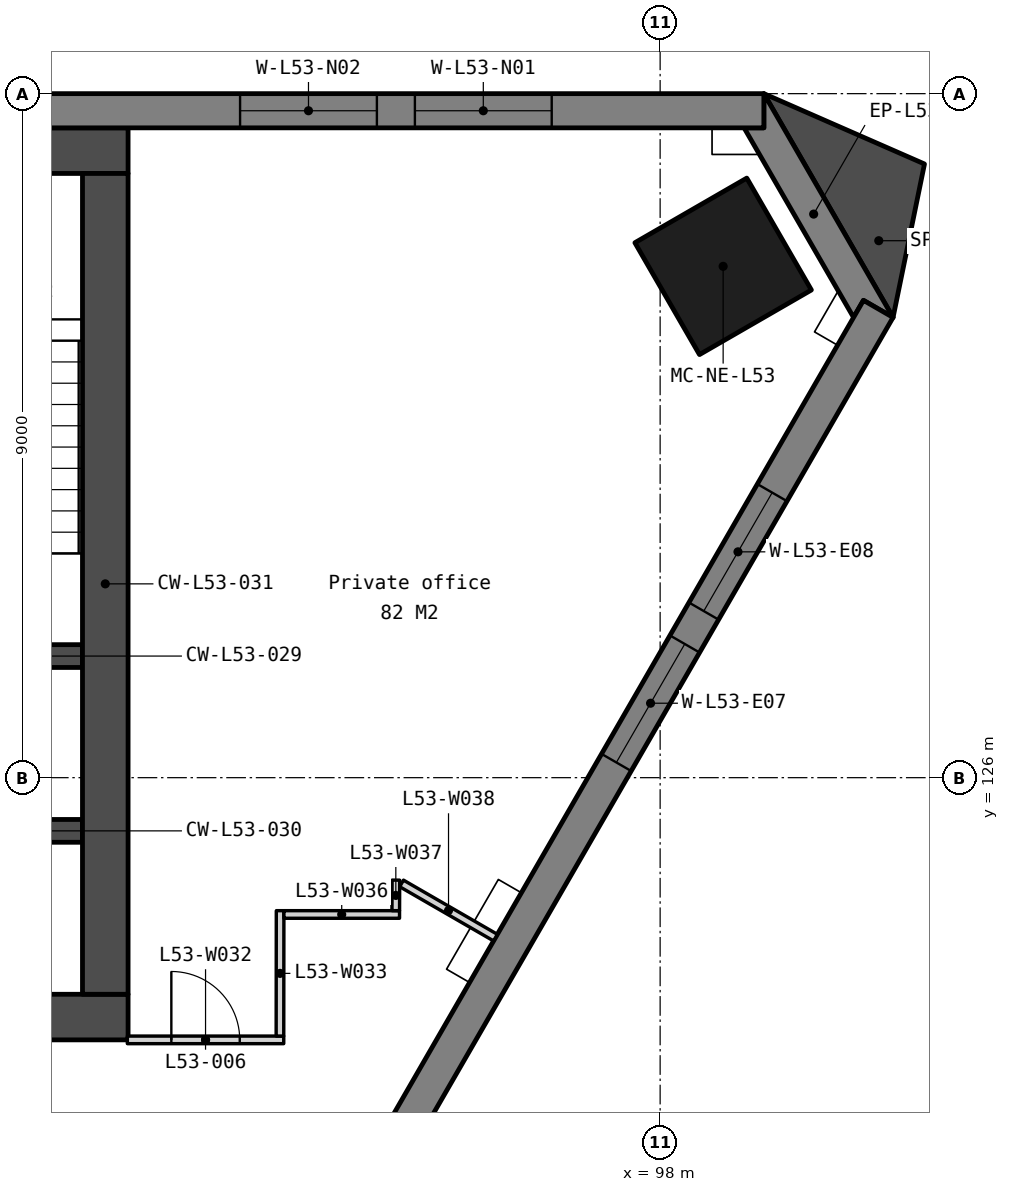
"""IFC4 building model, lengths in metres.
Left out: names, types, materials, properties, quantities, classifications, styles, units other than length and angle.
Written with IfcOpenShell. Run it as: python <this file> out.ifc"""

import sys

from ifc_helpers import new_model, si_unit, direction, frame, frame_2d, origin, origin_2d, place, context, subcontext, project, spatial, polyline, rectangle, outline, extrude, element, fill, save


model = new_model("IFC4")
c1 = context("Model", 3, precision=1e-05, world=origin(), true_north=direction((0.0, 1.0)))
c2 = subcontext(c1, "Body", "Model", "MODEL_VIEW")
j1 = project(units=[si_unit("LENGTHUNIT", "METRE"), si_unit("PLANEANGLEUNIT", "RADIAN")], contexts=[c1])
p1 = place(None, origin())
s1 = spatial("IfcSite", under=j1, at=p1, CompositionType="ELEMENT")
p2 = place(p1, origin())
s2 = spatial("IfcBuilding", under=s1, at=p2, CompositionType="ELEMENT")
p3 = place(p2, frame((0.0, 0.0, 211.4)))
s3 = spatial("IfcBuildingStorey", under=s2, at=p3, CompositionType="ELEMENT", Elevation=211.4)
p4 = place(p3, frame((98.829, 132.728, 0.0), z_axis=(0.0, 0.0, 1.0), x_axis=(-0.5, 0.866025403784, 0.0)))
e1 = element("IfcColumn", 1, at=p4, inside=s3, PredefinedType="COLUMN", context=c2, shape_type="SweptSolid", body=[
    extrude(rectangle(XDim=1.7, YDim=1.7, at=origin_2d()), origin(), (0.0, 0.0, 1.0), 3.9),
])
p5 = place(p3, frame((69.0, 134.25, 0.0), z_axis=(0.0, 0.0, 1.0), x_axis=(1.0, 0.0, 0.0)))
e2 = element("IfcWall", 2, at=p5, inside=s3, PredefinedType="SOLIDWALL", context=c2, shape_type="SweptSolid", body=[
    extrude(rectangle(XDim=22.0, YDim=0.6, at=frame_2d((11.0, 0.0))), origin(), (0.0, 0.0, 1.0), 3.75),
])
p6 = place(p3, frame((69.0, 122.85, 0.0), z_axis=(0.0, 0.0, 1.0), x_axis=(1.0, 0.0, 0.0)))
e3 = element("IfcWall", 3, at=p6, inside=s3, PredefinedType="SOLIDWALL", context=c2, shape_type="SweptSolid", body=[
    extrude(rectangle(XDim=22.0, YDim=0.6, at=frame_2d((11.0, 0.0))), origin(), (0.0, 0.0, 1.0), 3.75),
])
p7 = place(p6, frame((16.375, 0.0, 0.0)))
e4 = element("IfcOpeningElement", 4, at=p7, cuts=e3, PredefinedType="OPENING", context=c2, shape_type="SweptSolid", body=[
    extrude(rectangle(XDim=1.8, YDim=2.1, at=frame_2d((0.9, 1.05))), frame((0.0, 0.31, 0.0), z_axis=(0.0, -1.0, 0.0), x_axis=(1.0, 0.0, 0.0)), (0.0, 0.0, 1.0), 0.62),
])
p8 = place(p6, frame((3.825, 0.0, 0.0)))
e5 = element("IfcOpeningElement", 5, at=p8, cuts=e3, PredefinedType="OPENING", context=c2, shape_type="SweptSolid", body=[
    extrude(rectangle(XDim=1.8, YDim=2.1, at=frame_2d((0.9, 1.05))), frame((0.0, 0.31, 0.0), z_axis=(0.0, -1.0, 0.0), x_axis=(1.0, 0.0, 0.0)), (0.0, 0.0, 1.0), 0.62),
])
p9 = place(p6, frame((12.85, 0.0, 0.0)))
e6 = element("IfcOpeningElement", 6, at=p9, cuts=e3, PredefinedType="OPENING", context=c2, shape_type="SweptSolid", body=[
    extrude(rectangle(XDim=1.5, YDim=2.1, at=frame_2d((0.75, 1.05))), frame((0.0, 0.31, 0.0), z_axis=(0.0, -1.0, 0.0), x_axis=(1.0, 0.0, 0.0)), (0.0, 0.0, 1.0), 0.62),
])
for number, where, z_axis, x_axis in (
    (7, (87.85, 127.6, 0.0), (0.0, 0.0, 1.0), (1.0, 0.0, 0.0)),
    (8, (87.85, 125.3, 0.0), (0.0, 0.0, 1.0), (1.0, 0.0, 0.0)),
):
    element("IfcWall", number, at=place(p3, frame(where, z_axis=z_axis, x_axis=x_axis)), inside=s3, PredefinedType="SOLIDWALL", context=c2, shape_type="SweptSolid", body=[
        extrude(rectangle(XDim=2.55, YDim=0.3, at=frame_2d((1.275, 0.0))), origin(), (0.0, 0.0, 1.0), 3.75),
    ])
p10 = place(p3, frame((90.7, 133.95, 0.0), z_axis=(0.0, 0.0, 1.0), x_axis=(0.0, -1.0, 0.0)))
e9 = element("IfcWall", 9, at=p10, inside=s3, PredefinedType="SOLIDWALL", context=c2, shape_type="SweptSolid", body=[
    extrude(rectangle(XDim=10.8, YDim=0.6, at=frame_2d((5.4, 0.0))), origin(), (0.0, 0.0, 1.0), 3.75),
])
p11 = place(p3, frame((0.0, 0.0, -0.15)))
e10 = element("IfcWall", 10, at=p11, inside=s3, PredefinedType="SOLIDWALL", context=c2, shape_type="SweptSolid", body=[
    extrude(outline(polyline([(101.065, 132.055), (100.675, 132.281), (100.545, 132.055), (99.105, 134.55), (99.365, 134.55), (99.365, 135.0), (101.065, 132.055)])), origin(), (0.0, 0.0, 1.0), 3.9),
])
p12 = place(p3, frame((99.365, 134.775, -0.15), z_axis=(0.0, 0.0, 1.0), x_axis=(-1.0, 0.0, 0.0)))
e11 = element("IfcWall", 11, at=p12, inside=s3, PredefinedType="SOLIDWALL", context=c2, shape_type="SweptSolid", body=[
    extrude(outline(polyline([(38.729, 0.0), (38.729, 3.9), (0.0, 3.9), (0.0, 0.0), (38.729, 0.0)])), frame((0.0, 0.225, 0.0), z_axis=(0.0, -1.0, 0.0), x_axis=(1.0, 0.0, 0.0)), (0.0, 0.0, 1.0), 0.45),
])
p13 = place(p12, frame((2.791, 0.0, 0.95)))
e12 = element("IfcOpeningElement", 12, at=p13, cuts=e11, PredefinedType="OPENING", context=c2, shape_type="SweptSolid", body=[
    extrude(rectangle(XDim=1.8, YDim=2.2, at=frame_2d((0.9, 1.1))), frame((0.0, 0.235, 0.0), z_axis=(0.0, -1.0, 0.0), x_axis=(1.0, 0.0, 0.0)), (0.0, 0.0, 1.0), 0.47),
])
p14 = place(p12, frame((5.091, 0.0, 0.95)))
e13 = element("IfcOpeningElement", 13, at=p14, cuts=e11, PredefinedType="OPENING", context=c2, shape_type="SweptSolid", body=[
    extrude(rectangle(XDim=1.8, YDim=2.2, at=frame_2d((0.9, 1.1))), frame((0.0, 0.235, 0.0), z_axis=(0.0, -1.0, 0.0), x_axis=(1.0, 0.0, 0.0)), (0.0, 0.0, 1.0), 0.47),
])
p15 = place(p12, frame((12.473, 0.0, 0.95)))
e14 = element("IfcOpeningElement", 14, at=p15, cuts=e11, PredefinedType="OPENING", context=c2, shape_type="SweptSolid", body=[
    extrude(rectangle(XDim=1.8, YDim=2.2, at=frame_2d((0.9, 1.1))), frame((0.0, 0.235, 0.0), z_axis=(0.0, -1.0, 0.0), x_axis=(1.0, 0.0, 0.0)), (0.0, 0.0, 1.0), 0.47),
])
p16 = place(p12, frame((14.773, 0.0, 0.95)))
e15 = element("IfcOpeningElement", 15, at=p16, cuts=e11, PredefinedType="OPENING", context=c2, shape_type="SweptSolid", body=[
    extrude(rectangle(XDim=1.8, YDim=2.2, at=frame_2d((0.9, 1.1))), frame((0.0, 0.235, 0.0), z_axis=(0.0, -1.0, 0.0), x_axis=(1.0, 0.0, 0.0)), (0.0, 0.0, 1.0), 0.47),
])
p17 = place(p12, frame((22.156, 0.0, 0.95)))
e16 = element("IfcOpeningElement", 16, at=p17, cuts=e11, PredefinedType="OPENING", context=c2, shape_type="SweptSolid", body=[
    extrude(rectangle(XDim=1.8, YDim=2.2, at=frame_2d((0.9, 1.1))), frame((0.0, 0.235, 0.0), z_axis=(0.0, -1.0, 0.0), x_axis=(1.0, 0.0, 0.0)), (0.0, 0.0, 1.0), 0.47),
])
p18 = place(p12, frame((24.456, 0.0, 0.95)))
e17 = element("IfcOpeningElement", 17, at=p18, cuts=e11, PredefinedType="OPENING", context=c2, shape_type="SweptSolid", body=[
    extrude(rectangle(XDim=1.8, YDim=2.2, at=frame_2d((0.9, 1.1))), frame((0.0, 0.235, 0.0), z_axis=(0.0, -1.0, 0.0), x_axis=(1.0, 0.0, 0.0)), (0.0, 0.0, 1.0), 0.47),
])
p19 = place(p12, frame((31.838, 0.0, 0.95)))
e18 = element("IfcOpeningElement", 18, at=p19, cuts=e11, PredefinedType="OPENING", context=c2, shape_type="SweptSolid", body=[
    extrude(rectangle(XDim=1.8, YDim=2.2, at=frame_2d((0.9, 1.1))), frame((0.0, 0.235, 0.0), z_axis=(0.0, -1.0, 0.0), x_axis=(1.0, 0.0, 0.0)), (0.0, 0.0, 1.0), 0.47),
])
p20 = place(p12, frame((34.138, 0.0, 0.95)))
e19 = element("IfcOpeningElement", 19, at=p20, cuts=e11, PredefinedType="OPENING", context=c2, shape_type="SweptSolid", body=[
    extrude(rectangle(XDim=1.8, YDim=2.2, at=frame_2d((0.9, 1.1))), frame((0.0, 0.235, 0.0), z_axis=(0.0, -1.0, 0.0), x_axis=(1.0, 0.0, 0.0)), (0.0, 0.0, 1.0), 0.47),
])
p21 = place(p3, frame((81.505, 98.627, -0.15), z_axis=(0.0, 0.0, 1.0), x_axis=(0.500002199942, 0.866024133644, 0.0)))
e20 = element("IfcWall", 20, at=p21, inside=s3, PredefinedType="SOLIDWALL", context=c2, shape_type="SweptSolid", body=[
    extrude(outline(polyline([(38.729, 0.0), (38.729, 3.9), (0.0, 3.9), (0.0, 0.0), (38.729, 0.0)])), frame((0.0, 0.225, 0.0), z_axis=(0.0, -1.0, 0.0), x_axis=(1.0, 0.0, 0.0)), (0.0, 0.0, 1.0), 0.45),
])
p22 = place(p21, frame((2.791, 0.0, 0.95)))
e21 = element("IfcOpeningElement", 21, at=p22, cuts=e20, PredefinedType="OPENING", context=c2, shape_type="SweptSolid", body=[
    extrude(rectangle(XDim=1.8, YDim=2.2, at=frame_2d((0.9, 1.1))), frame((0.0, 0.235, 0.0), z_axis=(0.0, -1.0, 0.0), x_axis=(1.0, 0.0, 0.0)), (0.0, 0.0, 1.0), 0.47),
])
p23 = place(p21, frame((5.091, 0.0, 0.95)))
e22 = element("IfcOpeningElement", 22, at=p23, cuts=e20, PredefinedType="OPENING", context=c2, shape_type="SweptSolid", body=[
    extrude(rectangle(XDim=1.8, YDim=2.2, at=frame_2d((0.9, 1.1))), frame((0.0, 0.235, 0.0), z_axis=(0.0, -1.0, 0.0), x_axis=(1.0, 0.0, 0.0)), (0.0, 0.0, 1.0), 0.47),
])
p24 = place(p21, frame((12.473, 0.0, 0.95)))
e23 = element("IfcOpeningElement", 23, at=p24, cuts=e20, PredefinedType="OPENING", context=c2, shape_type="SweptSolid", body=[
    extrude(rectangle(XDim=1.8, YDim=2.2, at=frame_2d((0.9, 1.1))), frame((0.0, 0.235, 0.0), z_axis=(0.0, -1.0, 0.0), x_axis=(1.0, 0.0, 0.0)), (0.0, 0.0, 1.0), 0.47),
])
p25 = place(p21, frame((14.773, 0.0, 0.95)))
e24 = element("IfcOpeningElement", 24, at=p25, cuts=e20, PredefinedType="OPENING", context=c2, shape_type="SweptSolid", body=[
    extrude(rectangle(XDim=1.8, YDim=2.2, at=frame_2d((0.9, 1.1))), frame((0.0, 0.235, 0.0), z_axis=(0.0, -1.0, 0.0), x_axis=(1.0, 0.0, 0.0)), (0.0, 0.0, 1.0), 0.47),
])
p26 = place(p21, frame((22.156, 0.0, 0.95)))
e25 = element("IfcOpeningElement", 25, at=p26, cuts=e20, PredefinedType="OPENING", context=c2, shape_type="SweptSolid", body=[
    extrude(rectangle(XDim=1.8, YDim=2.2, at=frame_2d((0.9, 1.1))), frame((0.0, 0.235, 0.0), z_axis=(0.0, -1.0, 0.0), x_axis=(1.0, 0.0, 0.0)), (0.0, 0.0, 1.0), 0.47),
])
p27 = place(p21, frame((24.456, 0.0, 0.95)))
e26 = element("IfcOpeningElement", 26, at=p27, cuts=e20, PredefinedType="OPENING", context=c2, shape_type="SweptSolid", body=[
    extrude(rectangle(XDim=1.8, YDim=2.2, at=frame_2d((0.9, 1.1))), frame((0.0, 0.235, 0.0), z_axis=(0.0, -1.0, 0.0), x_axis=(1.0, 0.0, 0.0)), (0.0, 0.0, 1.0), 0.47),
])
p28 = place(p21, frame((31.838, 0.0, 0.95)))
e27 = element("IfcOpeningElement", 27, at=p28, cuts=e20, PredefinedType="OPENING", context=c2, shape_type="SweptSolid", body=[
    extrude(rectangle(XDim=1.8, YDim=2.2, at=frame_2d((0.9, 1.1))), frame((0.0, 0.235, 0.0), z_axis=(0.0, -1.0, 0.0), x_axis=(1.0, 0.0, 0.0)), (0.0, 0.0, 1.0), 0.47),
])
p29 = place(p21, frame((34.138, 0.0, 0.95)))
e28 = element("IfcOpeningElement", 28, at=p29, cuts=e20, PredefinedType="OPENING", context=c2, shape_type="SweptSolid", body=[
    extrude(rectangle(XDim=1.8, YDim=2.2, at=frame_2d((0.9, 1.1))), frame((0.0, 0.235, 0.0), z_axis=(0.0, -1.0, 0.0), x_axis=(1.0, 0.0, 0.0)), (0.0, 0.0, 1.0), 0.47),
])
p30 = place(p3, frame((0.0, 0.0, -0.15)))
e29 = element("IfcWall", 29, at=p30, inside=s3, PredefinedType="SOLIDWALL", context=c2, shape_type="SweptSolid", body=[
    extrude(outline(polyline([(101.065, 132.055), (101.478, 134.075), (99.365, 135.0), (101.065, 132.055)])), origin(), (0.0, 0.0, 1.0), 3.9),
])
p31 = place(p3, frame((90.99, 122.55, 0.0), z_axis=(0.0, 0.0, 1.0), x_axis=(1.0, 0.0, 0.0)))
e30 = element("IfcWall", 30, at=p31, inside=s3, PredefinedType="PARTITIONING", context=c2, shape_type="SweptSolid", body=[
    extrude(rectangle(XDim=2.058, YDim=0.1, at=frame_2d((1.029, 0.0))), origin(), (0.0, 0.0, 1.0), 3.75),
])
p32 = place(p31, frame((0.579, 0.0, 0.0)))
e31 = element("IfcOpeningElement", 31, at=p32, cuts=e30, PredefinedType="OPENING", context=c2, shape_type="SweptSolid", body=[
    extrude(rectangle(XDim=0.9, YDim=2.1, at=frame_2d((0.45, 1.05))), frame((0.0, 0.06, 0.0), z_axis=(0.0, -1.0, 0.0), x_axis=(1.0, 0.0, 0.0)), (0.0, 0.0, 1.0), 0.12),
])
p33 = place(p3, frame((92.998, 122.6, 0.0), z_axis=(0.0, 0.0, 1.0), x_axis=(0.001183781355, 0.999999299331, 0.0)))
e32 = element("IfcWall", 32, at=p33, inside=s3, PredefinedType="PARTITIONING", context=c2, shape_type="SweptSolid", body=[
    extrude(rectangle(XDim=1.65, YDim=0.1, at=frame_2d((0.825, 0.0))), origin(), (0.0, 0.0, 1.0), 3.75),
])
p34 = place(p3, frame((93.05, 124.2, 0.0), z_axis=(0.0, 0.0, 1.0), x_axis=(1.0, 0.0, 0.0)))
e33 = element("IfcWall", 33, at=p34, inside=s3, PredefinedType="PARTITIONING", context=c2, shape_type="SweptSolid", body=[
    extrude(rectangle(XDim=1.521, YDim=0.1, at=frame_2d((0.761, 0.0))), origin(), (0.0, 0.0, 1.0), 3.28),
])
p35 = place(p3, frame((94.522, 124.25, 0.0), z_axis=(0.0, 0.0, 1.0), x_axis=(0.004252695444, 0.99999095725, 0.0)))
e34 = element("IfcWall", 34, at=p35, inside=s3, PredefinedType="PARTITIONING", context=c2, shape_type="SweptSolid", body=[
    extrude(rectangle(XDim=0.402, YDim=0.1, at=frame_2d((0.201, 0.0))), origin(), (0.0, 0.0, 1.0), 3.75),
])
p36 = place(p3, frame((94.598, 124.609, 0.0), z_axis=(0.0, 0.0, 1.0), x_axis=(0.866097252637, -0.499875533482, 0.0)))
e35 = element("IfcWall", 35, at=p36, inside=s3, PredefinedType="PARTITIONING", context=c2, shape_type="SweptSolid", body=[
    extrude(rectangle(XDim=1.427, YDim=0.1, at=frame_2d((0.713, 0.0))), origin(), (0.0, 0.0, 1.0), 3.75),
])
p37 = place(p13, origin())
e36 = element("IfcWindow", 36, at=p37, inside=s3, PartitioningType="SINGLE_PANEL", PredefinedType="WINDOW", context=c2, shape_type="SweptSolid", body=[
    extrude(rectangle(XDim=1.8, YDim=2.2, at=frame_2d((0.9, 1.1))), frame((0.0, 0.03, 0.0), z_axis=(0.0, -1.0, 0.0), x_axis=(1.0, 0.0, 0.0)), (0.0, 0.0, 1.0), 0.06),
])
fill(e12, e36)
p38 = place(p14, origin())
e37 = element("IfcWindow", 37, at=p38, inside=s3, PartitioningType="SINGLE_PANEL", PredefinedType="WINDOW", context=c2, shape_type="SweptSolid", body=[
    extrude(rectangle(XDim=1.8, YDim=2.2, at=frame_2d((0.9, 1.1))), frame((0.0, 0.03, 0.0), z_axis=(0.0, -1.0, 0.0), x_axis=(1.0, 0.0, 0.0)), (0.0, 0.0, 1.0), 0.06),
])
fill(e13, e37)
p39 = place(p28, origin())
e38 = element("IfcWindow", 38, at=p39, inside=s3, PartitioningType="SINGLE_PANEL", PredefinedType="WINDOW", context=c2, shape_type="SweptSolid", body=[
    extrude(rectangle(XDim=1.8, YDim=2.2, at=frame_2d((0.9, 1.1))), frame((0.0, 0.03, 0.0), z_axis=(0.0, -1.0, 0.0), x_axis=(1.0, 0.0, 0.0)), (0.0, 0.0, 1.0), 0.06),
])
fill(e27, e38)
p40 = place(p29, origin())
e39 = element("IfcWindow", 39, at=p40, inside=s3, PartitioningType="SINGLE_PANEL", PredefinedType="WINDOW", context=c2, shape_type="SweptSolid", body=[
    extrude(rectangle(XDim=1.8, YDim=2.2, at=frame_2d((0.9, 1.1))), frame((0.0, 0.03, 0.0), z_axis=(0.0, -1.0, 0.0), x_axis=(1.0, 0.0, 0.0)), (0.0, 0.0, 1.0), 0.06),
])
fill(e28, e39)
p41 = place(p32, origin())
e40 = element("IfcDoor", 40, at=p41, inside=s3, OperationType="SINGLE_SWING_LEFT", PredefinedType="DOOR", context=c2, shape_type="SweptSolid", body=[
    extrude(rectangle(XDim=0.9, YDim=2.1, at=frame_2d((0.45, 1.05))), frame((0.0, 0.025, 0.0), z_axis=(0.0, -1.0, 0.0), x_axis=(1.0, 0.0, 0.0)), (0.0, 0.0, 1.0), 0.05),
])
fill(e31, e40)
save(model, sys.argv[1])
